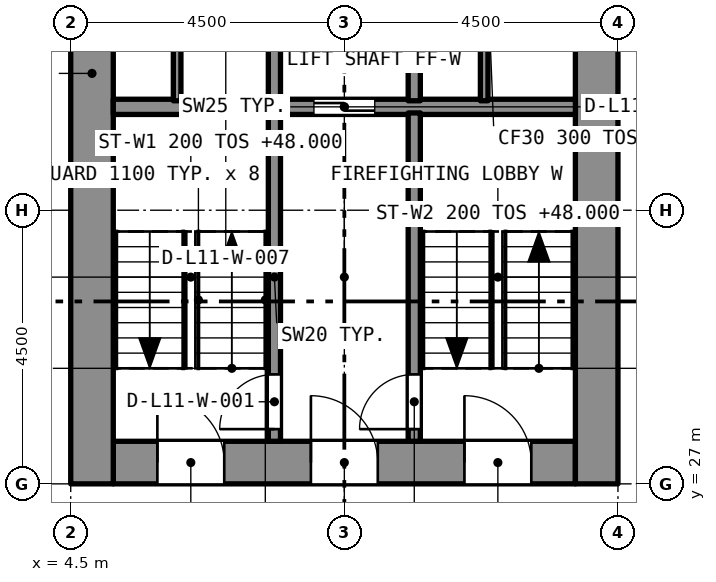
"""IFC4 building model, lengths in metres.
Left out: names, types, materials, properties, quantities, classifications, styles, units other than length and angle.
Written with IfcOpenShell. Run it as: python <this file> out.ifc"""

import sys

from ifc_helpers import new_model, si_unit, direction, frame, frame_2d, origin, place, context, subcontext, project, spatial, rectangle, extrude, element, fill, save


model = new_model("IFC4")
c1 = context("Model", 3, precision=1e-05, world=origin(), true_north=direction((0.0, 1.0)))
c2 = subcontext(c1, "Body", "Model", "MODEL_VIEW")
j1 = project(units=[si_unit("LENGTHUNIT", "METRE"), si_unit("PLANEANGLEUNIT", "RADIAN")], contexts=[c1])
p1 = place(None, origin())
s1 = spatial("IfcSite", under=j1, at=p1, CompositionType="ELEMENT")
p2 = place(p1, origin())
s2 = spatial("IfcBuilding", under=s1, at=p2, CompositionType="ELEMENT")
p3 = place(p2, frame((0.0, 0.0, 46.4)))
s3 = spatial("IfcBuildingStorey", under=s2, at=p3, CompositionType="ELEMENT", Elevation=46.4)
p4 = place(p3, frame((5.2, 27.35, 0.0), z_axis=(0.0, 0.0, 1.0), x_axis=(1.0, 0.0, 0.0)))
e1 = element("IfcWall", 1, at=p4, inside=s3, PredefinedType="SOLIDWALL", context=c2, shape_type="SweptSolid", body=[
    extrude(rectangle(XDim=7.6, YDim=0.7, at=frame_2d((3.8, 0.0))), origin(), (0.0, 0.0, 1.0), 3.2),
])
p5 = place(p4, frame((0.725, 0.0, 0.0)))
e2 = element("IfcOpeningElement", 2, at=p5, cuts=e1, PredefinedType="OPENING", context=c2, shape_type="SweptSolid", body=[
    extrude(rectangle(XDim=1.1, YDim=2.1, at=frame_2d((0.55, 1.05))), frame((0.0, 0.36, 0.0), z_axis=(0.0, -1.0, 0.0), x_axis=(1.0, 0.0, 0.0)), (0.0, 0.0, 1.0), 0.72),
])
p6 = place(p4, frame((3.25, 0.0, 0.0)))
e3 = element("IfcOpeningElement", 3, at=p6, cuts=e1, PredefinedType="OPENING", context=c2, shape_type="SweptSolid", body=[
    extrude(rectangle(XDim=1.1, YDim=2.1, at=frame_2d((0.55, 1.05))), frame((0.0, 0.36, 0.0), z_axis=(0.0, -1.0, 0.0), x_axis=(1.0, 0.0, 0.0)), (0.0, 0.0, 1.0), 0.72),
])
p7 = place(p4, frame((5.775, 0.0, 0.0)))
e4 = element("IfcOpeningElement", 4, at=p7, cuts=e1, PredefinedType="OPENING", context=c2, shape_type="SweptSolid", body=[
    extrude(rectangle(XDim=1.1, YDim=2.1, at=frame_2d((0.55, 1.05))), frame((0.0, 0.36, 0.0), z_axis=(0.0, -1.0, 0.0), x_axis=(1.0, 0.0, 0.0)), (0.0, 0.0, 1.0), 0.72),
])
p8 = place(p3, frame((4.85, 27.0, 0.0), z_axis=(0.0, 0.0, 1.0), x_axis=(0.0, 1.0, 0.0)))
e5 = element("IfcWall", 5, at=p8, inside=s3, PredefinedType="SOLIDWALL", context=c2, shape_type="SweptSolid", body=[
    extrude(rectangle(XDim=13.5, YDim=0.7, at=frame_2d((6.75, 0.0))), origin(), (0.0, 0.0, 1.0), 3.2),
])
p9 = place(p8, frame((8.95, 0.0, 0.0)))
e6 = element("IfcOpeningElement", 6, at=p9, cuts=e5, PredefinedType="OPENING", context=c2, shape_type="SweptSolid", body=[
    extrude(rectangle(XDim=1.2, YDim=2.1, at=frame_2d((0.6, 1.05))), frame((0.0, 0.36, 0.0), z_axis=(0.0, -1.0, 0.0), x_axis=(1.0, 0.0, 0.0)), (0.0, 0.0, 1.0), 0.72),
])
p10 = place(p3, frame((13.15, 27.0, 0.0), z_axis=(0.0, 0.0, 1.0), x_axis=(0.0, 1.0, 0.0)))
e7 = element("IfcWall", 7, at=p10, inside=s3, PredefinedType="SOLIDWALL", context=c2, shape_type="SweptSolid", body=[
    extrude(rectangle(XDim=13.5, YDim=0.7, at=frame_2d((6.75, 0.0))), origin(), (0.0, 0.0, 1.0), 3.2),
])
p11 = place(p10, frame((11.1, 0.0, 0.0)))
e8 = element("IfcOpeningElement", 8, at=p11, cuts=e7, PredefinedType="OPENING", context=c2, shape_type="SweptSolid", body=[
    extrude(rectangle(XDim=1.1, YDim=2.1, at=frame_2d((0.55, 1.05))), frame((0.0, 0.36, 0.0), z_axis=(0.0, -1.0, 0.0), x_axis=(1.0, 0.0, 0.0)), (0.0, 0.0, 1.0), 0.72),
])
p12 = place(p10, frame((8.95, 0.0, 0.0)))
e9 = element("IfcOpeningElement", 9, at=p12, cuts=e7, PredefinedType="OPENING", context=c2, shape_type="SweptSolid", body=[
    extrude(rectangle(XDim=1.2, YDim=2.1, at=frame_2d((0.6, 1.05))), frame((0.0, 0.36, 0.0), z_axis=(0.0, -1.0, 0.0), x_axis=(1.0, 0.0, 0.0)), (0.0, 0.0, 1.0), 0.72),
])
p13 = place(p3, frame((5.2, 33.2, 0.0), z_axis=(0.0, 0.0, 1.0), x_axis=(1.0, 0.0, 0.0)))
e10 = element("IfcWall", 10, at=p13, inside=s3, PredefinedType="SOLIDWALL", context=c2, shape_type="SweptSolid", body=[
    extrude(rectangle(XDim=7.6, YDim=0.25, at=frame_2d((3.8, 0.0))), origin(), (0.0, 0.0, 1.0), 2.9),
])
p14 = place(p13, frame((3.3, 0.0, 0.0)))
e11 = element("IfcOpeningElement", 11, at=p14, cuts=e10, PredefinedType="OPENING", context=c2, shape_type="SweptSolid", body=[
    extrude(rectangle(XDim=1.0, YDim=2.1, at=frame_2d((0.5, 1.05))), frame((0.0, 0.135, 0.0), z_axis=(0.0, -1.0, 0.0), x_axis=(1.0, 0.0, 0.0)), (0.0, 0.0, 1.0), 0.27),
])
p15 = place(p3, frame((7.85, 27.7, 0.0), z_axis=(0.0, 0.0, 1.0), x_axis=(0.0, 1.0, 0.0)))
e12 = element("IfcWall", 12, at=p15, inside=s3, PredefinedType="SOLIDWALL", context=c2, shape_type="SweptSolid", body=[
    extrude(rectangle(XDim=5.4, YDim=0.2, at=frame_2d((2.7, 0.0))), origin(), (0.0, 0.0, 1.0), 2.9),
])
p16 = place(p15, frame((0.2, 0.0, 0.0)))
e13 = element("IfcOpeningElement", 13, at=p16, cuts=e12, PredefinedType="OPENING", context=c2, shape_type="SweptSolid", body=[
    extrude(rectangle(XDim=0.9, YDim=2.1, at=frame_2d((0.45, 1.05))), frame((0.0, 0.11, 0.0), z_axis=(0.0, -1.0, 0.0), x_axis=(1.0, 0.0, 0.0)), (0.0, 0.0, 1.0), 0.22),
])
p17 = place(p3, frame((10.15, 27.7, 0.0), z_axis=(0.0, 0.0, 1.0), x_axis=(0.0, 1.0, 0.0)))
e14 = element("IfcWall", 14, at=p17, inside=s3, PredefinedType="SOLIDWALL", context=c2, shape_type="SweptSolid", body=[
    extrude(rectangle(XDim=5.4, YDim=0.2, at=frame_2d((2.7, 0.0))), origin(), (0.0, 0.0, 1.0), 2.9),
])
p18 = place(p17, frame((0.2, 0.0, 0.0)))
e15 = element("IfcOpeningElement", 15, at=p18, cuts=e14, PredefinedType="OPENING", context=c2, shape_type="SweptSolid", body=[
    extrude(rectangle(XDim=0.9, YDim=2.1, at=frame_2d((0.45, 1.05))), frame((0.0, 0.11, 0.0), z_axis=(0.0, -1.0, 0.0), x_axis=(1.0, 0.0, 0.0)), (0.0, 0.0, 1.0), 0.22),
])
for number, where, z_axis, x_axis in (
    (16, (7.85, 33.3, 0.0), (0.0, 0.0, 1.0), (0.0, 1.0, 0.0)),
    (17, (10.15, 33.3, 0.0), (0.0, 0.0, 1.0), (0.0, 1.0, 0.0)),
):
    element("IfcWall", number, at=place(p3, frame(where, z_axis=z_axis, x_axis=x_axis)), inside=s3, PredefinedType="SOLIDWALL", context=c2, shape_type="SweptSolid", body=[
        extrude(rectangle(XDim=2.3, YDim=0.2, at=frame_2d((1.15, 0.0))), origin(), (0.0, 0.0, 1.0), 2.9),
    ])
for number, where, z_axis, x_axis in (
    (18, (6.25, 33.3, 0.0), (0.0, 0.0, 1.0), (0.0, 1.0, 0.0)),
    (19, (11.3, 33.3, 0.0), (0.0, 0.0, 1.0), (0.0, 1.0, 0.0)),
):
    element("IfcWall", number, at=place(p3, frame(where, z_axis=z_axis, x_axis=x_axis)), inside=s3, PredefinedType="PARTITIONING", context=c2, shape_type="SweptSolid", body=[
        extrude(rectangle(XDim=2.3, YDim=0.125, at=frame_2d((1.15, 0.0))), origin(), (0.0, 0.0, 1.0), 2.9),
    ])
p19 = place(p16, origin())
e20 = element("IfcDoor", 20, at=p19, inside=s3, OperationType="SINGLE_SWING_LEFT", PredefinedType="DOOR", context=c2, shape_type="SweptSolid", body=[
    extrude(rectangle(XDim=0.9, YDim=2.1, at=frame_2d((0.45, 1.05))), frame((0.0, 0.025, 0.0), z_axis=(0.0, -1.0, 0.0), x_axis=(1.0, 0.0, 0.0)), (0.0, 0.0, 1.0), 0.05),
])
fill(e13, e20)
p20 = place(p18, origin())
e21 = element("IfcDoor", 21, at=p20, inside=s3, OperationType="SINGLE_SWING_LEFT", PredefinedType="DOOR", context=c2, shape_type="SweptSolid", body=[
    extrude(rectangle(XDim=0.9, YDim=2.1, at=frame_2d((0.45, 1.05))), frame((0.0, 0.025, 0.0), z_axis=(0.0, -1.0, 0.0), x_axis=(1.0, 0.0, 0.0)), (0.0, 0.0, 1.0), 0.05),
])
fill(e15, e21)
p21 = place(p14, origin())
e22 = element("IfcDoor", 22, at=p21, inside=s3, OperationType="SLIDING_TO_LEFT", PredefinedType="DOOR", context=c2, shape_type="SweptSolid", body=[
    extrude(rectangle(XDim=1.0, YDim=2.1, at=frame_2d((0.5, 1.05))), frame((0.0, 0.025, 0.0), z_axis=(0.0, -1.0, 0.0), x_axis=(1.0, 0.0, 0.0)), (0.0, 0.0, 1.0), 0.05),
])
fill(e11, e22)
p22 = place(p5, origin())
e23 = element("IfcDoor", 23, at=p22, inside=s3, OperationType="SINGLE_SWING_LEFT", PredefinedType="DOOR", context=c2, shape_type="SweptSolid", body=[
    extrude(rectangle(XDim=1.1, YDim=2.1, at=frame_2d((0.55, 1.05))), frame((0.0, 0.025, 0.0), z_axis=(0.0, -1.0, 0.0), x_axis=(1.0, 0.0, 0.0)), (0.0, 0.0, 1.0), 0.05),
])
fill(e2, e23)
p23 = place(p6, origin())
e24 = element("IfcDoor", 24, at=p23, inside=s3, OperationType="SINGLE_SWING_LEFT", PredefinedType="DOOR", context=c2, shape_type="SweptSolid", body=[
    extrude(rectangle(XDim=1.1, YDim=2.1, at=frame_2d((0.55, 1.05))), frame((0.0, 0.025, 0.0), z_axis=(0.0, -1.0, 0.0), x_axis=(1.0, 0.0, 0.0)), (0.0, 0.0, 1.0), 0.05),
])
fill(e3, e24)
p24 = place(p7, origin())
e25 = element("IfcDoor", 25, at=p24, inside=s3, OperationType="SINGLE_SWING_LEFT", PredefinedType="DOOR", context=c2, shape_type="SweptSolid", body=[
    extrude(rectangle(XDim=1.1, YDim=2.1, at=frame_2d((0.55, 1.05))), frame((0.0, 0.025, 0.0), z_axis=(0.0, -1.0, 0.0), x_axis=(1.0, 0.0, 0.0)), (0.0, 0.0, 1.0), 0.05),
])
fill(e4, e25)
save(model, sys.argv[1])
